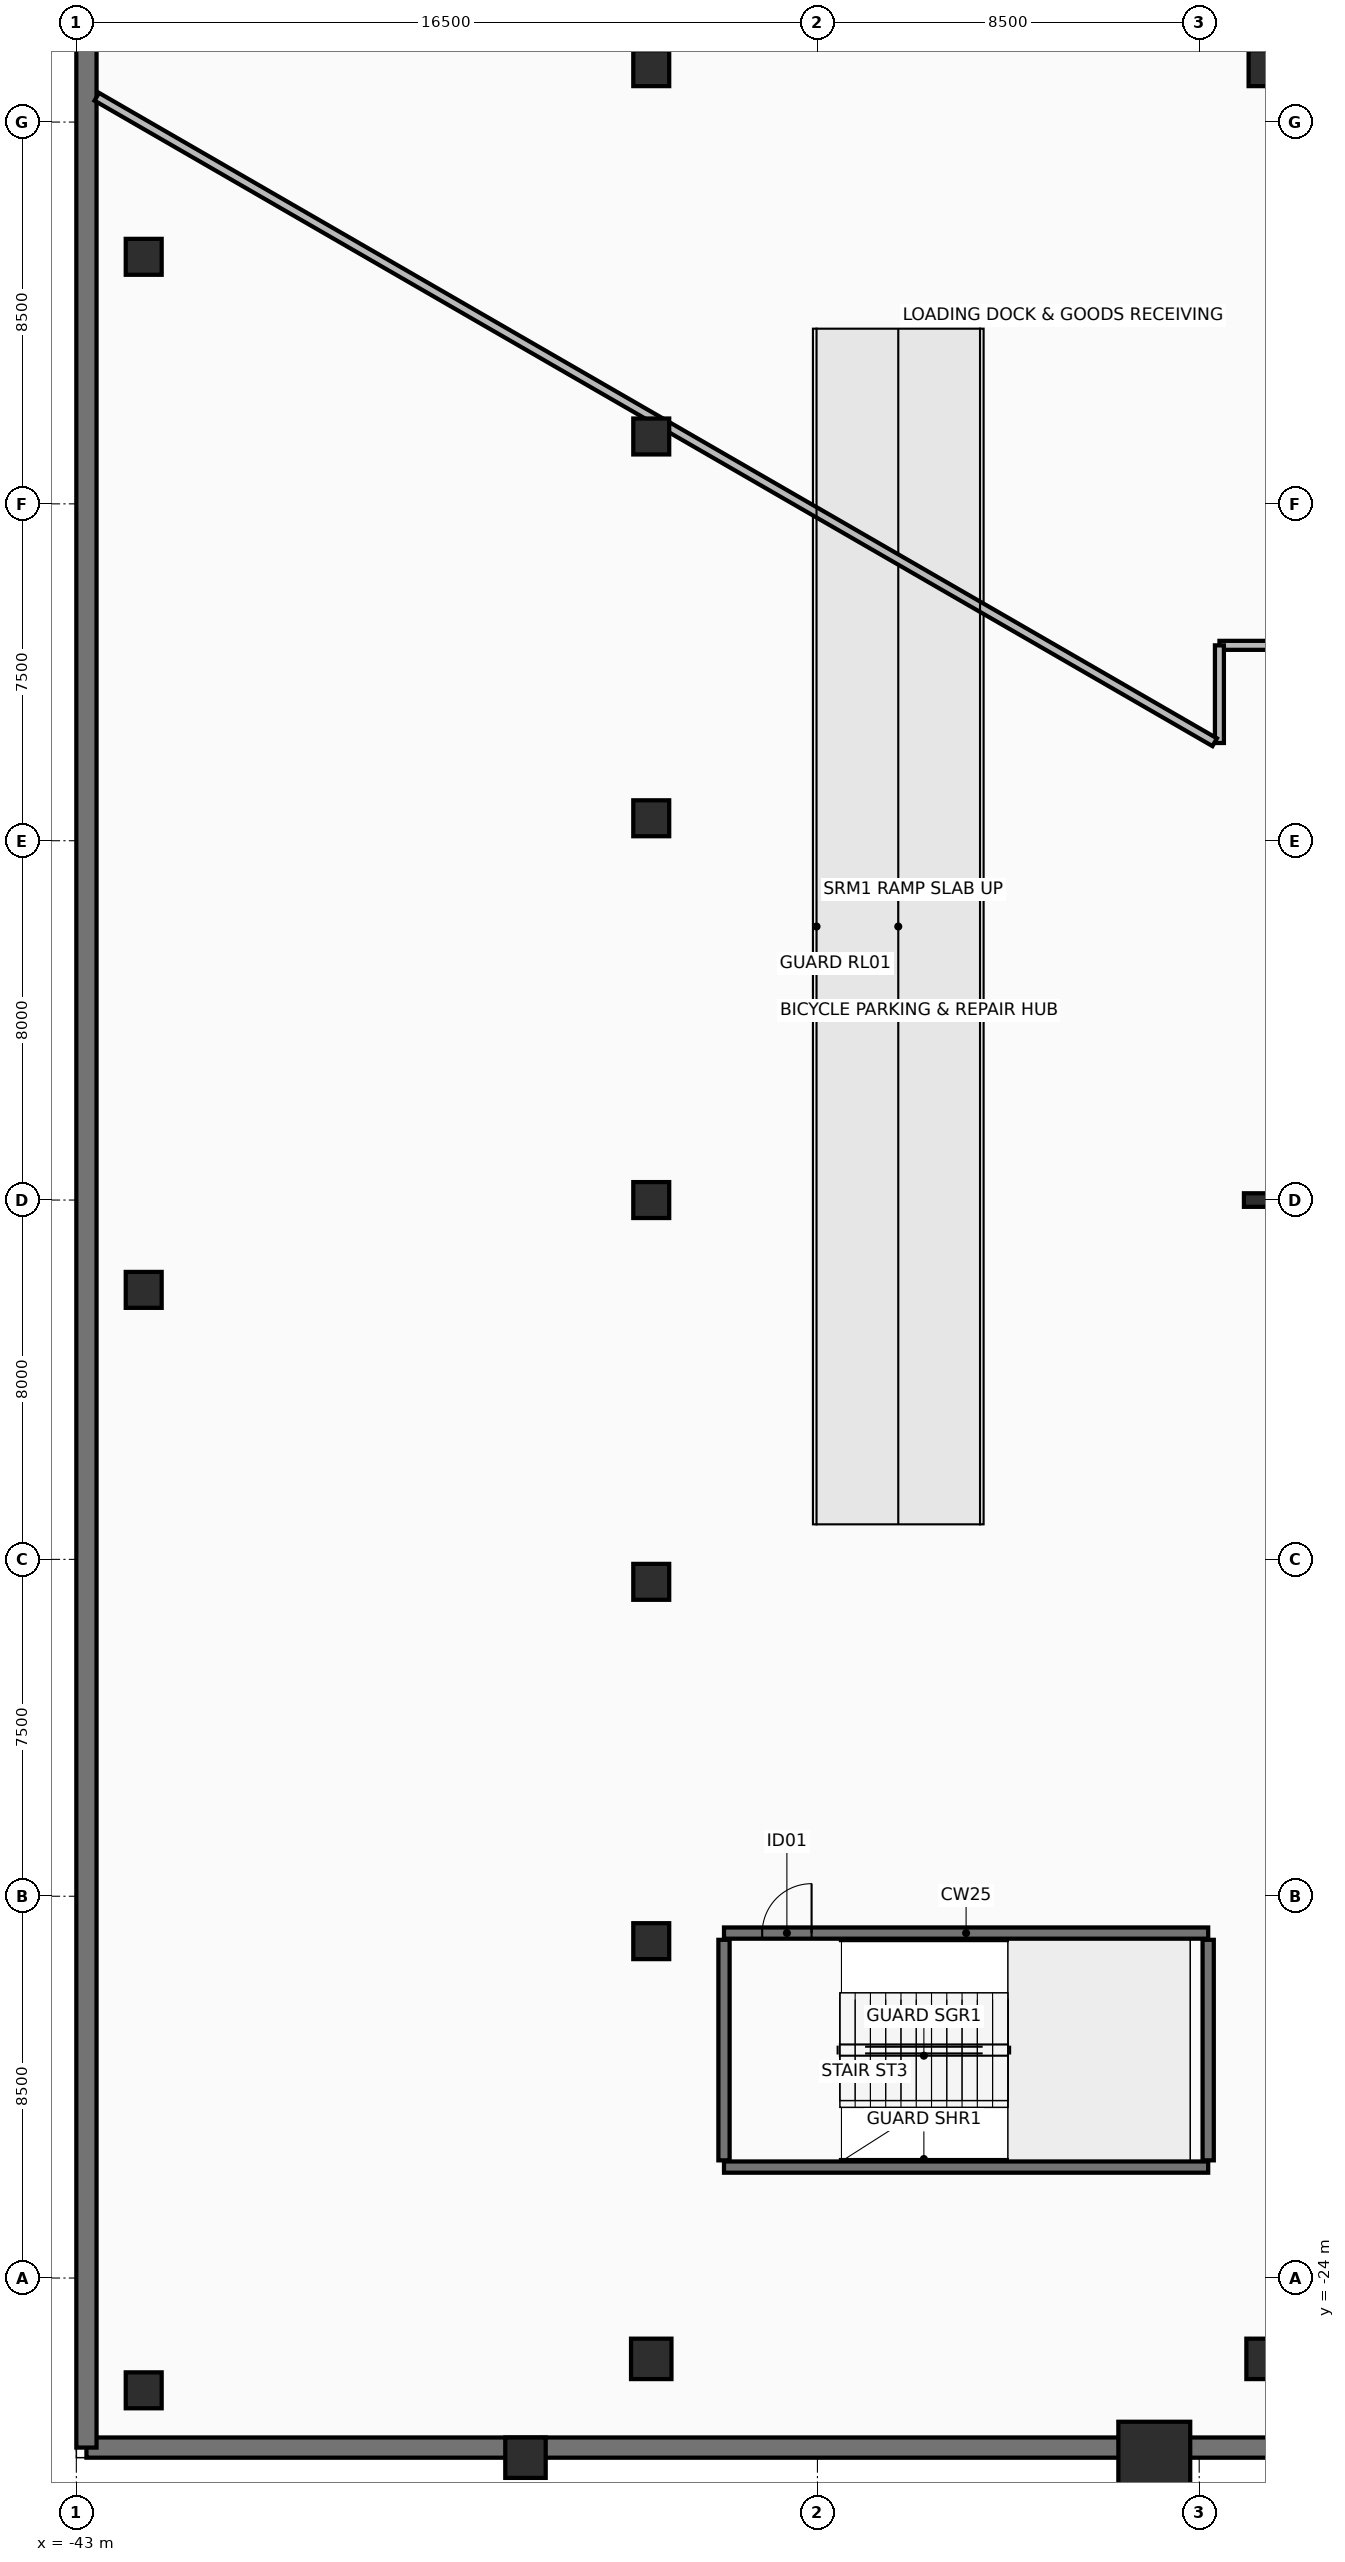
"""IFC4 building model, lengths in metres.
Left out: names, types, materials, properties, quantities, classifications, styles, units other than length and angle.
Written with IfcOpenShell. Run it as: python <this file> out.ifc"""

import sys

from ifc_helpers import new_model, si_unit, direction, frame, frame_2d, origin, origin_2d, place, context, subcontext, project, spatial, rectangle, hollow_rectangle, i_section, extrude, element, fill, save


model = new_model("IFC4")
c1 = context("Model", 3, precision=1e-05, world=origin(), true_north=direction((0.0, 1.0)))
c2 = subcontext(c1, "Body", "Model", "MODEL_VIEW")
j1 = project(units=[si_unit("LENGTHUNIT", "METRE"), si_unit("PLANEANGLEUNIT", "RADIAN")], contexts=[c1])
p1 = place(None, origin())
s1 = spatial("IfcSite", under=j1, at=p1, CompositionType="ELEMENT")
p2 = place(p1, origin())
s2 = spatial("IfcBuilding", under=s1, at=p2, CompositionType="ELEMENT")
p3 = place(p2, frame((0.0, 0.0, -4.5)))
s3 = spatial("IfcBuildingStorey", under=s2, at=p3, CompositionType="ELEMENT", Elevation=-4.5)
p4 = place(p3, frame((-30.2, -25.8, 0.0), z_axis=(0.0, 0.0, 1.0), x_axis=(1.0, 0.0, 0.0)))
e1 = element("IfcColumn", 1, at=p4, inside=s3, PredefinedType="COLUMN", context=c2, shape_type="SweptSolid", body=[
    extrude(hollow_rectangle(XDim=0.9, YDim=0.9, WallThickness=0.05, at=origin_2d()), origin(), (0.0, 0.0, 1.0), 4.5),
])
p5 = place(p3, frame((-30.2, 25.2, 0.0), z_axis=(0.0, 0.0, 1.0), x_axis=(1.0, 0.0, 0.0)))
e2 = element("IfcColumn", 2, at=p5, inside=s3, PredefinedType="COLUMN", context=c2, shape_type="SweptSolid", body=[
    extrude(hollow_rectangle(XDim=0.8, YDim=0.8, WallThickness=0.045, at=origin_2d()), origin(), (0.0, 0.0, 1.0), 4.5),
])
p6 = place(p3, frame((-16.5, -25.8, 0.0), z_axis=(0.0, 0.0, 1.0), x_axis=(1.0, 0.0, 0.0)))
e3 = element("IfcColumn", 3, at=p6, inside=s3, PredefinedType="COLUMN", context=c2, shape_type="SweptSolid", body=[
    extrude(hollow_rectangle(XDim=0.9, YDim=0.9, WallThickness=0.05, at=origin_2d()), origin(), (0.0, 0.0, 1.0), 4.5),
])
for number, where, z_axis, x_axis in (
    (4, (-16.5, 25.2, 0.0), (0.0, 0.0, 1.0), (1.0, 0.0, 0.0)),
    (5, (-30.2, -16.5, 0.0), (0.0, 0.0, 1.0), (1.0, 0.0, 0.0)),
    (6, (-30.2, -8.5, 0.0), (0.0, 0.0, 1.0), (1.0, 0.0, 0.0)),
    (7, (-30.2, 0.0, 0.0), (0.0, 0.0, 1.0), (1.0, 0.0, 0.0)),
    (8, (-30.2, 8.5, 0.0), (0.0, 0.0, 1.0), (1.0, 0.0, 0.0)),
    (9, (-30.2, 17.0, 0.0), (0.0, 0.0, 1.0), (1.0, 0.0, 0.0)),
):
    element("IfcColumn", number, at=place(p3, frame(where, z_axis=z_axis, x_axis=x_axis)), inside=s3, PredefinedType="COLUMN", context=c2, shape_type="SweptSolid", body=[
        extrude(hollow_rectangle(XDim=0.8, YDim=0.8, WallThickness=0.045, at=origin_2d()), origin(), (0.0, 0.0, 1.0), 4.5),
    ])
p7 = place(p3, frame((-16.5, 0.0, 0.0), z_axis=(0.0, 0.0, 1.0), x_axis=(1.0, 0.0, 0.0)))
e10 = element("IfcColumn", 10, at=p7, inside=s3, PredefinedType="COLUMN", context=c2, shape_type="SweptSolid", body=[
    extrude(i_section(OverallWidth=0.302, OverallDepth=1.008, WebThickness=0.021, FlangeThickness=0.04, at=origin_2d()), origin(), (0.0, 0.0, 1.0), 4.5),
])
p8 = place(p3, frame((-19.0, -28.0, 0.0), z_axis=(0.0, 0.0, 1.0), x_axis=(1.0, 0.0, 0.0)))
e11 = element("IfcColumn", 11, at=p8, inside=s3, PredefinedType="COLUMN", context=c2, shape_type="SweptSolid", body=[
    extrude(rectangle(XDim=1.6, YDim=1.6, at=origin_2d()), origin(), (0.0, 0.0, 1.0), 4.5),
])
p9 = place(p3, frame((-33.0, -28.0, 0.0), z_axis=(0.0, 0.0, 1.0), x_axis=(1.0, 0.0, 0.0)))
e12 = element("IfcColumn", 12, at=p9, inside=s3, PredefinedType="COLUMN", context=c2, shape_type="SweptSolid", body=[
    extrude(hollow_rectangle(XDim=0.9, YDim=0.9, WallThickness=0.05, at=origin_2d()), origin(), (0.0, 0.0, 1.0), 4.5),
])
for number, where, z_axis, x_axis in (
    (13, (-41.5, -26.5, 0.0), (0.0, 0.0, 1.0), (1.0, 0.0, 0.0)),
    (14, (-41.5, -2.0, 0.0), (0.0, 0.0, 1.0), (1.0, 0.0, 0.0)),
    (15, (-41.5, 21.0, 0.0), (0.0, 0.0, 1.0), (1.0, 0.0, 0.0)),
):
    element("IfcColumn", number, at=place(p3, frame(where, z_axis=z_axis, x_axis=x_axis)), inside=s3, PredefinedType="COLUMN", context=c2, shape_type="SweptSolid", body=[
        extrude(hollow_rectangle(XDim=0.8, YDim=0.8, WallThickness=0.045, at=origin_2d()), origin(), (0.0, 0.0, 1.0), 4.5),
    ])
p10 = place(p3, frame((-42.775, -27.775, 0.0), z_axis=(0.0, 0.0, 1.0), x_axis=(1.0, 0.0, 0.0)))
e16 = element("IfcWall", 16, at=p10, inside=s3, PredefinedType="STANDARD", context=c2, shape_type="SweptSolid", body=[
    extrude(rectangle(XDim=85.55, YDim=0.45, at=frame_2d((42.775, 0.0))), origin(), (0.0, 0.0, 1.0), 4.2),
])
p11 = place(p3, frame((-42.775, 26.575, 0.0), z_axis=(0.0, 0.0, 1.0), x_axis=(0.0, -1.0, 0.0)))
e17 = element("IfcWall", 17, at=p11, inside=s3, PredefinedType="STANDARD", context=c2, shape_type="SweptSolid", body=[
    extrude(rectangle(XDim=54.35, YDim=0.45, at=frame_2d((27.175, 0.0))), origin(), (0.0, 0.0, 1.0), 4.2),
])
p12 = place(p3, frame((-28.58, -16.32, 0.0), z_axis=(0.0, 0.0, 1.0), x_axis=(1.0, 0.0, 0.0)))
e18 = element("IfcWall", 18, at=p12, inside=s3, PredefinedType="SHEAR", context=c2, shape_type="SweptSolid", body=[
    extrude(rectangle(XDim=10.78, YDim=0.25, at=frame_2d((5.39, 0.0))), origin(), (0.0, 0.0, 1.0), 4.2),
])
p13 = place(p12, frame((0.85, 0.0, 0.0)))
e19 = element("IfcOpeningElement", 19, at=p13, cuts=e18, PredefinedType="OPENING", context=c2, shape_type="SweptSolid", body=[
    extrude(rectangle(XDim=1.1, YDim=2.15, at=frame_2d((0.55, 1.075))), frame((0.0, 0.135, 0.0), z_axis=(0.0, -1.0, 0.0), x_axis=(1.0, 0.0, 0.0)), (0.0, 0.0, 1.0), 0.27),
])
p14 = place(p3, frame((-28.58, -21.53, 0.0), z_axis=(0.0, 0.0, 1.0), x_axis=(1.0, 0.0, 0.0)))
e20 = element("IfcWall", 20, at=p14, inside=s3, PredefinedType="SHEAR", context=c2, shape_type="SweptSolid", body=[
    extrude(rectangle(XDim=10.78, YDim=0.25, at=frame_2d((5.39, 0.0))), origin(), (0.0, 0.0, 1.0), 4.2),
])
for number, where, z_axis, x_axis in (
    (21, (-28.58, -21.38, 0.0), (0.0, 0.0, 1.0), (0.0, 1.0, 0.0)),
    (22, (-17.8, -21.38, 0.0), (0.0, 0.0, 1.0), (0.0, 1.0, 0.0)),
):
    element("IfcWall", number, at=place(p3, frame(where, z_axis=z_axis, x_axis=x_axis)), inside=s3, PredefinedType="SHEAR", context=c2, shape_type="SweptSolid", body=[
        extrude(rectangle(XDim=4.91, YDim=0.25, at=frame_2d((2.455, 0.0))), origin(), (0.0, 0.0, 1.0), 4.2),
    ])
p15 = place(p3, frame((-15.505, 12.35, 0.0), z_axis=(0.0, 0.0, 1.0), x_axis=(-1.0, 0.0, 0.0)))
e23 = element("IfcWall", 23, at=p15, inside=s3, PredefinedType="PARTITIONING", context=c2, shape_type="SweptSolid", body=[
    extrude(rectangle(XDim=2.044, YDim=0.2, at=frame_2d((1.022, 0.0))), origin(), (0.0, 0.0, 1.0), 3.545),
])
p16 = place(p3, frame((-17.55, 12.349, 0.0), z_axis=(0.0, 0.0, 1.0), x_axis=(0.0, -1.0, 0.0)))
e24 = element("IfcWall", 24, at=p16, inside=s3, PredefinedType="PARTITIONING", context=c2, shape_type="SweptSolid", body=[
    extrude(rectangle(XDim=2.174, YDim=0.2, at=frame_2d((1.087, 0.0))), origin(), (0.0, 0.0, 1.0), 4.2),
])
p17 = place(p3, frame((-17.655, 10.193, 0.0), z_axis=(0.0, 0.0, 1.0), x_axis=(-0.866026443251, 0.499998199587, 0.0)))
e25 = element("IfcWall", 25, at=p17, inside=s3, PredefinedType="PARTITIONING", context=c2, shape_type="SweptSolid", body=[
    extrude(rectangle(XDim=28.74, YDim=0.2, at=frame_2d((14.37, 0.0))), origin(), (0.0, 0.0, 1.0), 3.395),
])
p18 = place(p13, frame((1.1, 0.0, 0.0), z_axis=(0.0, 0.0, 1.0), x_axis=(-1.0, 0.0, 0.0)))
e26 = element("IfcDoor", 26, at=p18, inside=s3, OperationType="SINGLE_SWING_LEFT", PredefinedType="DOOR", context=c2, shape_type="SweptSolid", body=[
    extrude(rectangle(XDim=1.1, YDim=2.15, at=frame_2d((0.55, 1.075))), frame((0.0, 0.025, 0.0), z_axis=(0.0, -1.0, 0.0), x_axis=(1.0, 0.0, 0.0)), (0.0, 0.0, 1.0), 0.05),
])
fill(e19, e26)
save(model, sys.argv[1])
